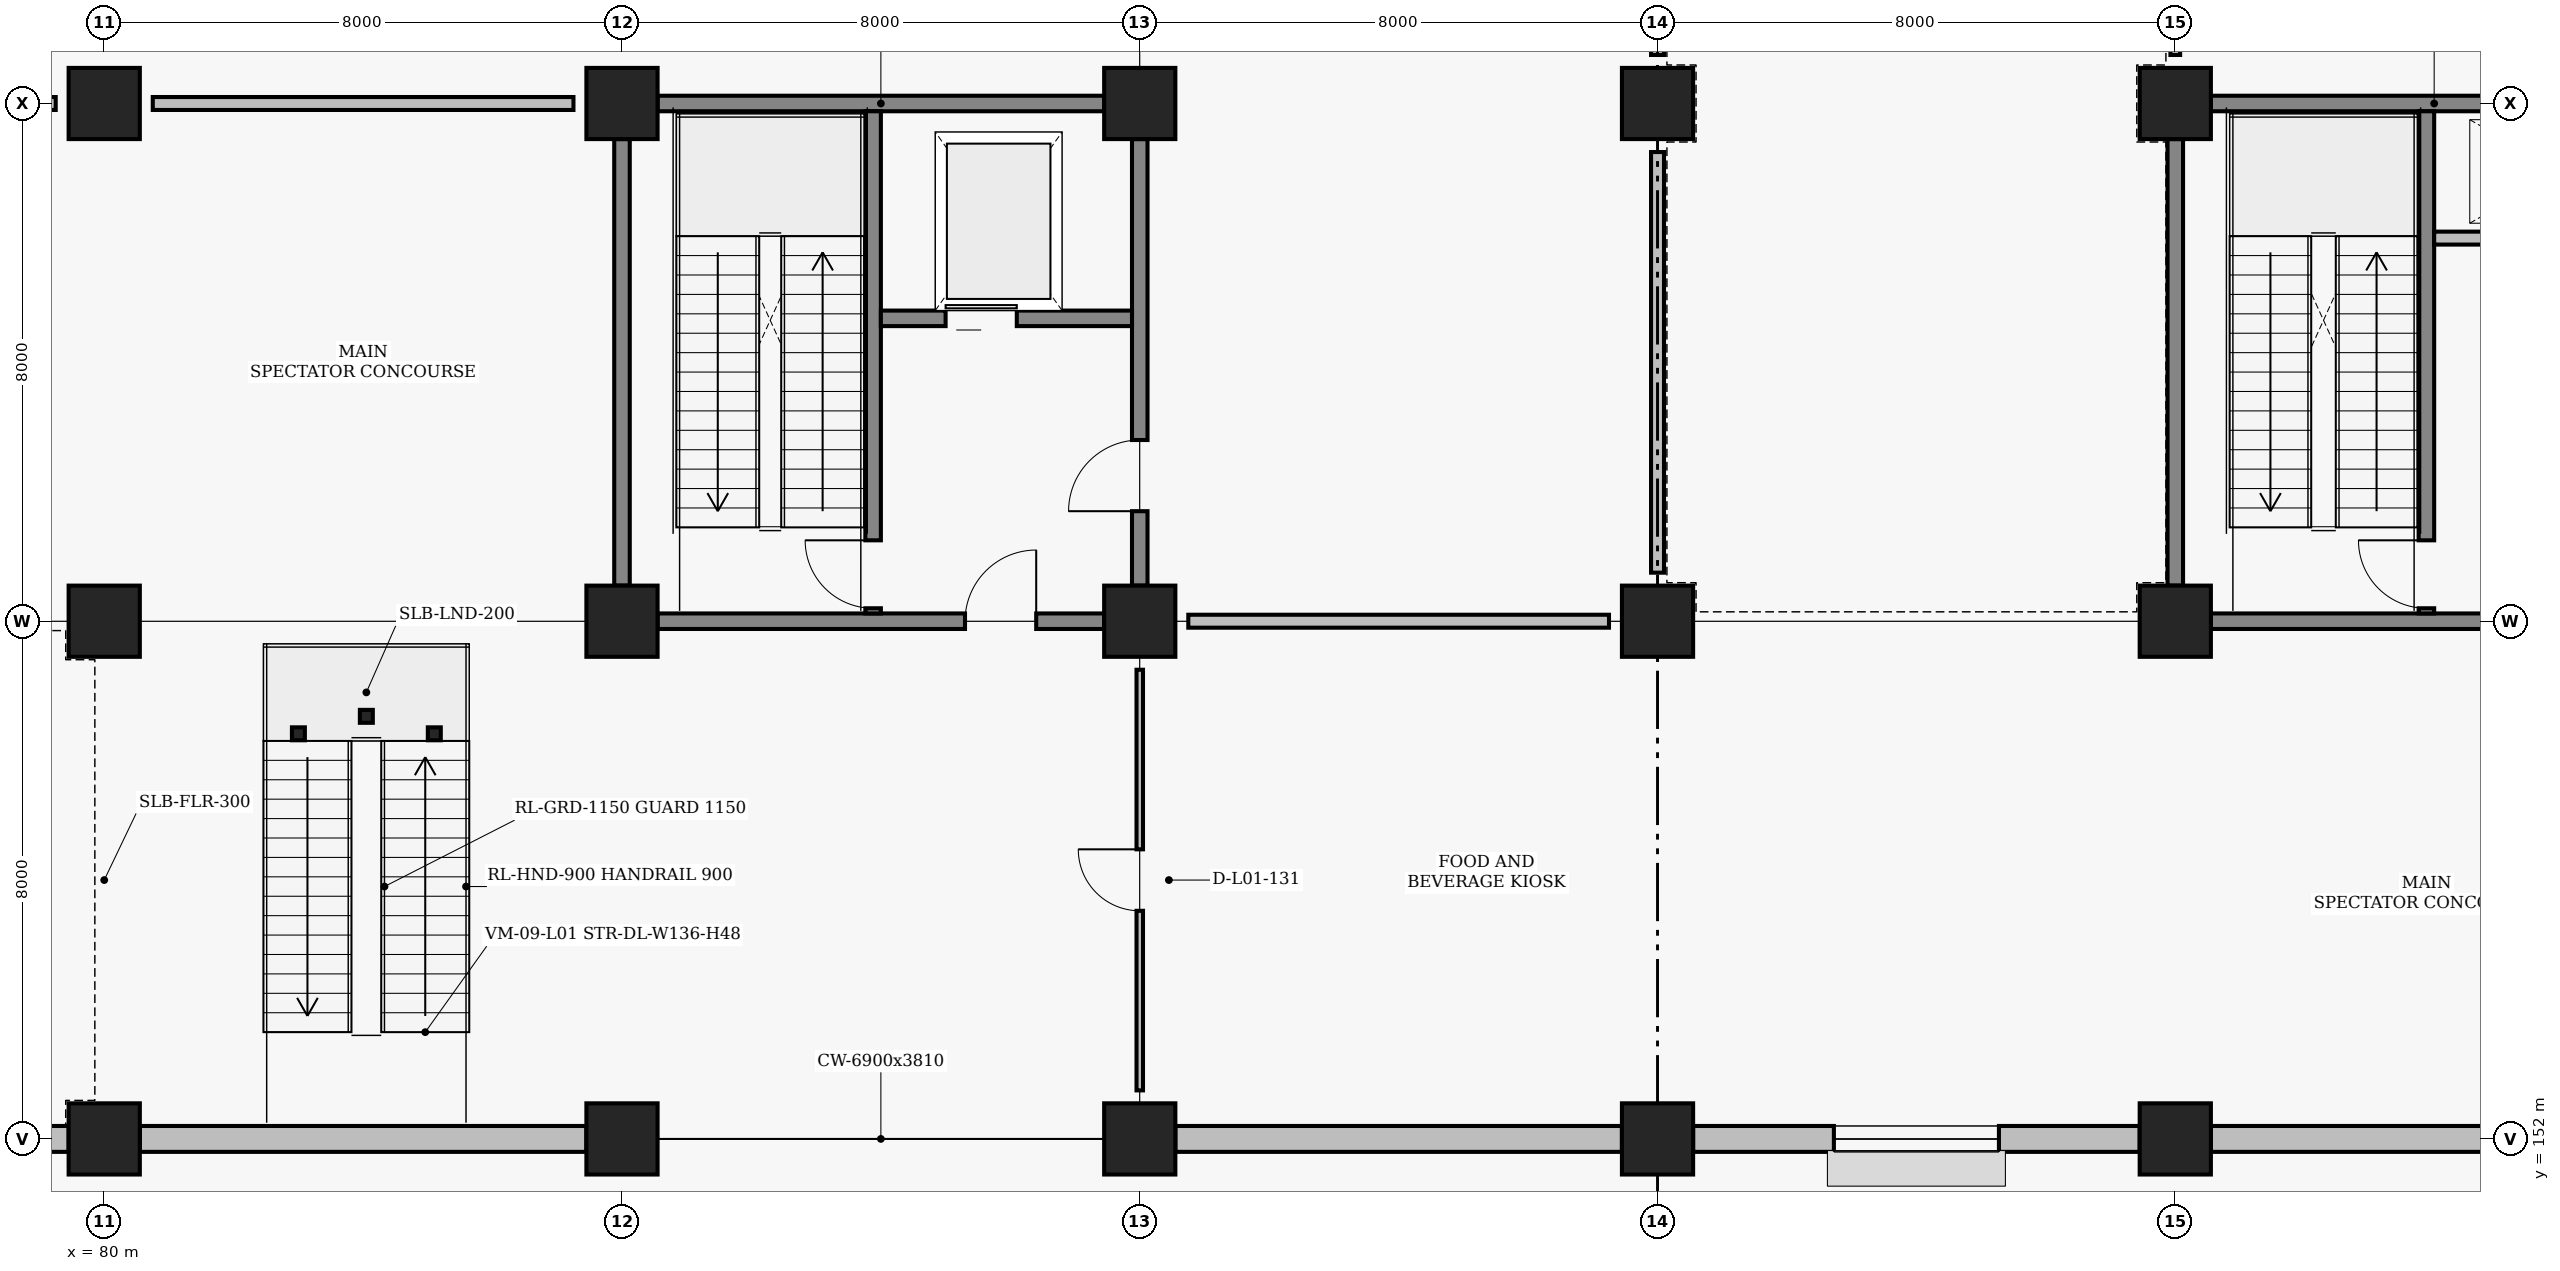
"""IFC4 building model, lengths in metres.
Left out: names, types, materials, properties, quantities, classifications, styles, units other than length and angle.
Written with IfcOpenShell. Run it as: python <this file> out.ifc"""

import sys

from ifc_helpers import new_model, si_unit, direction, frame, frame_2d, origin, origin_2d, place, context, subcontext, project, spatial, rectangle, hollow_rectangle, extrude, element, fill, save


model = new_model("IFC4")
c1 = context("Model", 3, precision=1e-05, world=origin(), true_north=direction((0.0, 1.0)))
c2 = subcontext(c1, "Body", "Model", "MODEL_VIEW")
j1 = project(units=[si_unit("LENGTHUNIT", "METRE"), si_unit("PLANEANGLEUNIT", "RADIAN")], contexts=[c1])
p1 = place(None, origin())
s1 = spatial("IfcSite", under=j1, at=p1, CompositionType="ELEMENT")
p2 = place(p1, origin())
s2 = spatial("IfcBuilding", under=s1, at=p2, CompositionType="ELEMENT")
p3 = place(p2, origin())
s3 = spatial("IfcBuildingStorey", under=s2, at=p3, CompositionType="ELEMENT", Elevation=0.0)
for number, where, z_axis, x_axis in (
    (1, (80.0, 152.0, 0.0), (0.0, 0.0, 1.0), (1.0, 0.0, 0.0)),
    (2, (80.0, 160.0, 0.0), (0.0, 0.0, 1.0), (1.0, 0.0, 0.0)),
    (3, (80.0, 168.0, 0.0), (0.0, 0.0, 1.0), (1.0, 0.0, 0.0)),
    (4, (88.0, 152.0, 0.0), (0.0, 0.0, 1.0), (1.0, 0.0, 0.0)),
    (5, (88.0, 160.0, 0.0), (0.0, 0.0, 1.0), (1.0, 0.0, 0.0)),
    (6, (88.0, 168.0, 0.0), (0.0, 0.0, 1.0), (1.0, 0.0, 0.0)),
    (7, (96.0, 152.0, 0.0), (0.0, 0.0, 1.0), (1.0, 0.0, 0.0)),
    (8, (96.0, 160.0, 0.0), (0.0, 0.0, 1.0), (1.0, 0.0, 0.0)),
    (9, (96.0, 168.0, 0.0), (0.0, 0.0, 1.0), (1.0, 0.0, 0.0)),
    (10, (104.0, 152.0, 0.0), (0.0, 0.0, 1.0), (1.0, 0.0, 0.0)),
    (11, (104.0, 160.0, 0.0), (0.0, 0.0, 1.0), (1.0, 0.0, 0.0)),
    (12, (104.0, 168.0, 0.0), (0.0, 0.0, 1.0), (1.0, 0.0, 0.0)),
    (13, (112.0, 152.0, 0.0), (0.0, 0.0, 1.0), (1.0, 0.0, 0.0)),
    (14, (112.0, 160.0, 0.0), (0.0, 0.0, 1.0), (1.0, 0.0, 0.0)),
    (15, (112.0, 168.0, 0.0), (0.0, 0.0, 1.0), (1.0, 0.0, 0.0)),
):
    element("IfcColumn", number, at=place(p3, frame(where, z_axis=z_axis, x_axis=x_axis)), inside=s3, PredefinedType="COLUMN", context=c2, shape_type="SweptSolid", body=[
        extrude(rectangle(XDim=1.1, YDim=1.1, at=origin_2d()), origin(), (0.0, 0.0, 1.0), 4.8),
    ])
p4 = place(p3, frame((72.55, 152.0, 0.0), z_axis=(0.0, 0.0, 1.0), x_axis=(1.0, 0.0, 0.0)))
e16 = element("IfcWall", 16, at=p4, inside=s3, PredefinedType="SOLIDWALL", context=c2, shape_type="SweptSolid", body=[
    extrude(rectangle(XDim=6.9, YDim=0.4, at=frame_2d((3.45, 0.0))), origin(), (0.0, 0.0, 1.0), 3.81),
])
p5 = place(p4, frame((2.325, 0.0, 0.95)))
e17 = element("IfcOpeningElement", 17, at=p5, cuts=e16, PredefinedType="OPENING", context=c2, shape_type="SweptSolid", body=[
    extrude(rectangle(XDim=2.25, YDim=1.9, at=frame_2d((1.125, 0.95))), frame((0.0, 0.21, 0.0), z_axis=(0.0, -1.0, 0.0), x_axis=(1.0, 0.0, 0.0)), (0.0, 0.0, 1.0), 0.42),
])
for number, where, z_axis, x_axis in (
    (18, (80.55, 152.0, 0.0), (0.0, 0.0, 1.0), (1.0, 0.0, 0.0)),
    (19, (96.55, 152.0, 0.0), (0.0, 0.0, 1.0), (1.0, 0.0, 0.0)),
):
    element("IfcWall", number, at=place(p3, frame(where, z_axis=z_axis, x_axis=x_axis)), inside=s3, PredefinedType="SOLIDWALL", context=c2, shape_type="SweptSolid", body=[
        extrude(rectangle(XDim=6.9, YDim=0.4, at=frame_2d((3.45, 0.0))), origin(), (0.0, 0.0, 1.0), 3.81),
    ])
p6 = place(p3, frame((104.55, 152.0, 0.0), z_axis=(0.0, 0.0, 1.0), x_axis=(1.0, 0.0, 0.0)))
e20 = element("IfcWall", 20, at=p6, inside=s3, PredefinedType="SOLIDWALL", context=c2, shape_type="SweptSolid", body=[
    extrude(rectangle(XDim=6.9, YDim=0.4, at=frame_2d((3.45, 0.0))), origin(), (0.0, 0.0, 1.0), 3.81),
])
p7 = place(p6, frame((2.175, 0.0, 0.95)))
e21 = element("IfcOpeningElement", 21, at=p7, cuts=e20, PredefinedType="OPENING", context=c2, shape_type="SweptSolid", body=[
    extrude(rectangle(XDim=2.55, YDim=2.0, at=frame_2d((1.275, 1.0))), frame((0.0, 0.21, 0.0), z_axis=(0.0, -1.0, 0.0), x_axis=(1.0, 0.0, 0.0)), (0.0, 0.0, 1.0), 0.42),
])
p8 = place(p3, frame((112.55, 152.0, 0.0), z_axis=(0.0, 0.0, 1.0), x_axis=(1.0, 0.0, 0.0)))
e22 = element("IfcWall", 22, at=p8, inside=s3, PredefinedType="SOLIDWALL", context=c2, shape_type="SweptSolid", body=[
    extrude(rectangle(XDim=6.9, YDim=0.4, at=frame_2d((3.45, 0.0))), origin(), (0.0, 0.0, 1.0), 3.81),
])
p9 = place(p3, frame((88.55, 160.0, 0.0), z_axis=(0.0, 0.0, 1.0), x_axis=(1.0, 0.0, 0.0)))
e23 = element("IfcWall", 23, at=p9, inside=s3, PredefinedType="SHEAR", context=c2, shape_type="SweptSolid", body=[
    extrude(rectangle(XDim=6.9, YDim=0.24, at=frame_2d((3.45, 0.0))), origin(), (0.0, 0.0, 1.0), 3.66),
])
p10 = place(p9, frame((4.75, 0.0, 0.0)))
e24 = element("IfcOpeningElement", 24, at=p10, cuts=e23, PredefinedType="OPENING", context=c2, shape_type="SweptSolid", body=[
    extrude(rectangle(XDim=1.1, YDim=2.2, at=frame_2d((0.55, 1.1))), frame((0.0, 0.13, 0.0), z_axis=(0.0, -1.0, 0.0), x_axis=(1.0, 0.0, 0.0)), (0.0, 0.0, 1.0), 0.26),
])
p11 = place(p3, frame((88.55, 168.0, 0.0), z_axis=(0.0, 0.0, 1.0), x_axis=(1.0, 0.0, 0.0)))
e25 = element("IfcWall", 25, at=p11, inside=s3, PredefinedType="SHEAR", context=c2, shape_type="SweptSolid", body=[
    extrude(rectangle(XDim=6.9, YDim=0.24, at=frame_2d((3.45, 0.0))), origin(), (0.0, 0.0, 1.0), 3.71),
])
p12 = place(p3, frame((88.0, 160.55, 0.0), z_axis=(0.0, 0.0, 1.0), x_axis=(0.0, 1.0, 0.0)))
e26 = element("IfcWall", 26, at=p12, inside=s3, PredefinedType="SHEAR", context=c2, shape_type="SweptSolid", body=[
    extrude(rectangle(XDim=6.9, YDim=0.24, at=frame_2d((3.45, 0.0))), origin(), (0.0, 0.0, 1.0), 3.66),
])
p13 = place(p3, frame((96.0, 160.55, 0.0), z_axis=(0.0, 0.0, 1.0), x_axis=(0.0, 1.0, 0.0)))
e27 = element("IfcWall", 27, at=p13, inside=s3, PredefinedType="SHEAR", context=c2, shape_type="SweptSolid", body=[
    extrude(rectangle(XDim=6.9, YDim=0.24, at=frame_2d((3.45, 0.0))), origin(), (0.0, 0.0, 1.0), 3.71),
])
p14 = place(p13, frame((1.15, 0.0, 0.0)))
e28 = element("IfcOpeningElement", 28, at=p14, cuts=e27, PredefinedType="OPENING", context=c2, shape_type="SweptSolid", body=[
    extrude(rectangle(XDim=1.1, YDim=2.2, at=frame_2d((0.55, 1.1))), frame((0.0, 0.13, 0.0), z_axis=(0.0, -1.0, 0.0), x_axis=(1.0, 0.0, 0.0)), (0.0, 0.0, 1.0), 0.26),
])
p15 = place(p3, frame((91.88, 160.12, 0.0), z_axis=(0.0, 0.0, 1.0), x_axis=(0.0, 1.0, 0.0)))
e29 = element("IfcWall", 29, at=p15, inside=s3, PredefinedType="SHEAR", context=c2, shape_type="SweptSolid", body=[
    extrude(rectangle(XDim=7.76, YDim=0.24, at=frame_2d((3.88, 0.0))), origin(), (0.0, 0.0, 1.0), 4.01),
])
p16 = place(p15, frame((0.08, 0.0, 0.0)))
e30 = element("IfcOpeningElement", 30, at=p16, cuts=e29, PredefinedType="OPENING", context=c2, shape_type="SweptSolid", body=[
    extrude(rectangle(XDim=1.05, YDim=2.15, at=frame_2d((0.525, 1.075))), frame((0.0, 0.13, 0.0), z_axis=(0.0, -1.0, 0.0), x_axis=(1.0, 0.0, 0.0)), (0.0, 0.0, 1.0), 0.26),
])
p17 = place(p3, frame((92.0, 164.68, 0.0), z_axis=(0.0, 0.0, 1.0), x_axis=(1.0, 0.0, 0.0)))
e31 = element("IfcWall", 31, at=p17, inside=s3, PredefinedType="SHEAR", context=c2, shape_type="SweptSolid", body=[
    extrude(rectangle(XDim=3.88, YDim=0.24, at=frame_2d((1.94, 0.0))), origin(), (0.0, 0.0, 1.0), 3.81),
])
p18 = place(p17, frame((1.0, 0.0, 0.0)))
e32 = element("IfcOpeningElement", 32, at=p18, cuts=e31, PredefinedType="OPENING", context=c2, shape_type="SweptSolid", body=[
    extrude(rectangle(XDim=1.1, YDim=2.15, at=frame_2d((0.55, 1.075))), frame((0.0, 0.13, 0.0), z_axis=(0.0, -1.0, 0.0), x_axis=(1.0, 0.0, 0.0)), (0.0, 0.0, 1.0), 0.26),
])
p19 = place(p3, frame((112.55, 160.0, 0.0), z_axis=(0.0, 0.0, 1.0), x_axis=(1.0, 0.0, 0.0)))
e33 = element("IfcWall", 33, at=p19, inside=s3, PredefinedType="SHEAR", context=c2, shape_type="SweptSolid", body=[
    extrude(rectangle(XDim=6.9, YDim=0.24, at=frame_2d((3.45, 0.0))), origin(), (0.0, 0.0, 1.0), 3.66),
])
p20 = place(p19, frame((4.75, 0.0, 0.0)))
e34 = element("IfcOpeningElement", 34, at=p20, cuts=e33, PredefinedType="OPENING", context=c2, shape_type="SweptSolid", body=[
    extrude(rectangle(XDim=1.1, YDim=2.2, at=frame_2d((0.55, 1.1))), frame((0.0, 0.13, 0.0), z_axis=(0.0, -1.0, 0.0), x_axis=(1.0, 0.0, 0.0)), (0.0, 0.0, 1.0), 0.26),
])
for number, where, z_axis, x_axis in (
    (35, (112.55, 168.0, 0.0), (0.0, 0.0, 1.0), (1.0, 0.0, 0.0)),
    (36, (112.0, 160.55, 0.0), (0.0, 0.0, 1.0), (0.0, 1.0, 0.0)),
):
    element("IfcWall", number, at=place(p3, frame(where, z_axis=z_axis, x_axis=x_axis)), inside=s3, PredefinedType="SHEAR", context=c2, shape_type="SweptSolid", body=[
        extrude(rectangle(XDim=6.9, YDim=0.24, at=frame_2d((3.45, 0.0))), origin(), (0.0, 0.0, 1.0), 3.71),
    ])
p21 = place(p3, frame((115.88, 160.12, 0.0), z_axis=(0.0, 0.0, 1.0), x_axis=(0.0, 1.0, 0.0)))
e37 = element("IfcWall", 37, at=p21, inside=s3, PredefinedType="SHEAR", context=c2, shape_type="SweptSolid", body=[
    extrude(rectangle(XDim=7.76, YDim=0.24, at=frame_2d((3.88, 0.0))), origin(), (0.0, 0.0, 1.0), 4.01),
])
p22 = place(p21, frame((0.08, 0.0, 0.0)))
e38 = element("IfcOpeningElement", 38, at=p22, cuts=e37, PredefinedType="OPENING", context=c2, shape_type="SweptSolid", body=[
    extrude(rectangle(XDim=1.05, YDim=2.15, at=frame_2d((0.525, 1.075))), frame((0.0, 0.13, 0.0), z_axis=(0.0, -1.0, 0.0), x_axis=(1.0, 0.0, 0.0)), (0.0, 0.0, 1.0), 0.26),
])
p23 = place(p3, frame((116.0, 165.92, 0.0), z_axis=(0.0, 0.0, 1.0), x_axis=(1.0, 0.0, 0.0)))
e39 = element("IfcWall", 39, at=p23, inside=s3, PredefinedType="PARTITIONING", context=c2, shape_type="SweptSolid", body=[
    extrude(rectangle(XDim=3.88, YDim=0.2, at=frame_2d((1.94, 0.0))), origin(), (0.0, 0.0, 1.0), 3.81),
])
p24 = place(p23, frame((1.25, 0.0, 0.0)))
e40 = element("IfcOpeningElement", 40, at=p24, cuts=e39, PredefinedType="OPENING", context=c2, shape_type="SweptSolid", body=[
    extrude(rectangle(XDim=0.85, YDim=2.05, at=frame_2d((0.425, 1.025))), frame((0.0, 0.11, 0.0), z_axis=(0.0, -1.0, 0.0), x_axis=(1.0, 0.0, 0.0)), (0.0, 0.0, 1.0), 0.22),
])
for number, where, z_axis, x_axis in (
    (41, (83.0, 158.26, 0.0), (0.0, 0.0, 1.0), (1.0, 0.0, 0.0)),
    (42, (85.1, 158.26, 0.0), (0.0, 0.0, 1.0), (1.0, 0.0, 0.0)),
    (43, (84.05, 158.53, 0.0), (0.0, 0.0, 1.0), (1.0, 0.0, 0.0)),
):
    element("IfcColumn", number, at=place(p3, frame(where, z_axis=z_axis, x_axis=x_axis)), inside=s3, PredefinedType="COLUMN", context=c2, shape_type="SweptSolid", body=[
        extrude(hollow_rectangle(XDim=0.2, YDim=0.2, WallThickness=0.009, at=origin_2d()), origin(), (0.0, 0.0, 1.0), 2.2),
    ])
p25 = place(p3, frame((72.75, 168.0, 0.0), z_axis=(0.0, 0.0, 1.0), x_axis=(1.0, 0.0, 0.0)))
e44 = element("IfcWall", 44, at=p25, inside=s3, PredefinedType="PARTITIONING", context=c2, shape_type="SweptSolid", body=[
    extrude(rectangle(XDim=6.5, YDim=0.2, at=frame_2d((3.25, 0.0))), origin(), (0.0, 0.0, 1.0), 3.66),
])
p26 = place(p3, frame((80.75, 168.0, 0.0), z_axis=(0.0, 0.0, 1.0), x_axis=(1.0, 0.0, 0.0)))
e45 = element("IfcWall", 45, at=p26, inside=s3, PredefinedType="PARTITIONING", context=c2, shape_type="SweptSolid", body=[
    extrude(rectangle(XDim=6.5, YDim=0.2, at=frame_2d((3.25, 0.0))), origin(), (0.0, 0.0, 1.0), 3.91),
])
p27 = place(p3, frame((104.0, 160.75, 0.0), z_axis=(0.0, 0.0, 1.0), x_axis=(0.0, 1.0, 0.0)))
e46 = element("IfcWall", 46, at=p27, inside=s3, PredefinedType="PARTITIONING", context=c2, shape_type="SweptSolid", body=[
    extrude(rectangle(XDim=6.5, YDim=0.2, at=frame_2d((3.25, 0.0))), origin(), (0.0, 0.0, 1.0), 3.81),
])
p28 = place(p3, frame((96.75, 160.0, 0.0), z_axis=(0.0, 0.0, 1.0), x_axis=(1.0, 0.0, 0.0)))
e47 = element("IfcWall", 47, at=p28, inside=s3, PredefinedType="PARTITIONING", context=c2, shape_type="SweptSolid", body=[
    extrude(rectangle(XDim=6.5, YDim=0.2, at=frame_2d((3.25, 0.0))), origin(), (0.0, 0.0, 1.0), 3.91),
])
p29 = place(p3, frame((104.0, 168.75, 0.0), z_axis=(0.0, 0.0, 1.0), x_axis=(0.0, 1.0, 0.0)))
e48 = element("IfcWall", 48, at=p29, inside=s3, PredefinedType="PARTITIONING", context=c2, shape_type="SweptSolid", body=[
    extrude(rectangle(XDim=8.5, YDim=0.2, at=frame_2d((4.25, 0.0))), origin(), (0.0, 0.0, 1.0), 3.71),
])
p30 = place(p3, frame((96.0, 152.75, 0.0), z_axis=(0.0, 0.0, 1.0), x_axis=(0.0, 1.0, 0.0)))
e49 = element("IfcWall", 49, at=p30, inside=s3, PredefinedType="PARTITIONING", context=c2, shape_type="SweptSolid", body=[
    extrude(rectangle(XDim=6.5, YDim=0.1, at=frame_2d((3.25, 0.0))), origin(), (0.0, 0.0, 1.0), 3.81),
])
p31 = place(p30, frame((2.775, 0.0, 0.0)))
e50 = element("IfcOpeningElement", 50, at=p31, cuts=e49, PredefinedType="OPENING", context=c2, shape_type="SweptSolid", body=[
    extrude(rectangle(XDim=0.95, YDim=2.1, at=frame_2d((0.475, 1.05))), frame((0.0, 0.06, 0.0), z_axis=(0.0, -1.0, 0.0), x_axis=(1.0, 0.0, 0.0)), (0.0, 0.0, 1.0), 0.12),
])
p32 = place(p3, frame((112.0, 168.75, 0.0), z_axis=(0.0, 0.0, 1.0), x_axis=(0.0, 1.0, 0.0)))
e51 = element("IfcWall", 51, at=p32, inside=s3, PredefinedType="PARTITIONING", context=c2, shape_type="SweptSolid", body=[
    extrude(rectangle(XDim=8.5, YDim=0.15, at=frame_2d((4.25, 0.0))), origin(), (0.0, 0.0, 1.0), 3.71),
])
p33 = place(p32, frame((3.35, 0.0, 0.0)))
e52 = element("IfcOpeningElement", 52, at=p33, cuts=e51, PredefinedType="OPENING", context=c2, shape_type="SweptSolid", body=[
    extrude(rectangle(XDim=1.8, YDim=2.3, at=frame_2d((0.9, 1.15))), frame((0.0, 0.085, 0.0), z_axis=(0.0, -1.0, 0.0), x_axis=(1.0, 0.0, 0.0)), (0.0, 0.0, 1.0), 0.17),
])
p34 = place(p7, origin())
e53 = element("IfcWindow", 53, at=p34, inside=s3, PartitioningType="SINGLE_PANEL", PredefinedType="WINDOW", context=c2, shape_type="SweptSolid", body=[
    extrude(rectangle(XDim=2.55, YDim=2.0, at=frame_2d((1.275, 1.0))), frame((0.0, 0.03, 0.0), z_axis=(0.0, -1.0, 0.0), x_axis=(1.0, 0.0, 0.0)), (0.0, 0.0, 1.0), 0.06),
])
fill(e21, e53)
p35 = place(p10, origin())
e54 = element("IfcDoor", 54, at=p35, inside=s3, OperationType="SINGLE_SWING_RIGHT", PredefinedType="DOOR", context=c2, shape_type="SweptSolid", body=[
    extrude(rectangle(XDim=1.1, YDim=2.2, at=frame_2d((0.55, 1.1))), frame((0.0, 0.025, 0.0), z_axis=(0.0, -1.0, 0.0), x_axis=(1.0, 0.0, 0.0)), (0.0, 0.0, 1.0), 0.05),
])
fill(e24, e54)
p36 = place(p14, origin())
e55 = element("IfcDoor", 55, at=p36, inside=s3, OperationType="SINGLE_SWING_LEFT", PredefinedType="DOOR", context=c2, shape_type="SweptSolid", body=[
    extrude(rectangle(XDim=1.1, YDim=2.2, at=frame_2d((0.55, 1.1))), frame((0.0, 0.025, 0.0), z_axis=(0.0, -1.0, 0.0), x_axis=(1.0, 0.0, 0.0)), (0.0, 0.0, 1.0), 0.05),
])
fill(e28, e55)
p37 = place(p16, origin())
e56 = element("IfcDoor", 56, at=p37, inside=s3, OperationType="SINGLE_SWING_RIGHT", PredefinedType="DOOR", context=c2, shape_type="SweptSolid", body=[
    extrude(rectangle(XDim=1.05, YDim=2.15, at=frame_2d((0.525, 1.075))), frame((0.0, 0.025, 0.0), z_axis=(0.0, -1.0, 0.0), x_axis=(1.0, 0.0, 0.0)), (0.0, 0.0, 1.0), 0.05),
])
fill(e30, e56)
p38 = place(p18, origin())
e57 = element("IfcDoor", 57, at=p38, inside=s3, OperationType="SLIDING_TO_LEFT", PredefinedType="DOOR", context=c2, shape_type="SweptSolid", body=[
    extrude(rectangle(XDim=1.1, YDim=2.15, at=frame_2d((0.55, 1.075))), frame((0.0, 0.025, 0.0), z_axis=(0.0, -1.0, 0.0), x_axis=(1.0, 0.0, 0.0)), (0.0, 0.0, 1.0), 0.05),
])
fill(e32, e57)
p39 = place(p22, origin())
e58 = element("IfcDoor", 58, at=p39, inside=s3, OperationType="SINGLE_SWING_RIGHT", PredefinedType="DOOR", context=c2, shape_type="SweptSolid", body=[
    extrude(rectangle(XDim=1.05, YDim=2.15, at=frame_2d((0.525, 1.075))), frame((0.0, 0.025, 0.0), z_axis=(0.0, -1.0, 0.0), x_axis=(1.0, 0.0, 0.0)), (0.0, 0.0, 1.0), 0.05),
])
fill(e38, e58)
p40 = place(p31, origin())
e59 = element("IfcDoor", 59, at=p40, inside=s3, OperationType="SINGLE_SWING_RIGHT", PredefinedType="DOOR", context=c2, shape_type="SweptSolid", body=[
    extrude(rectangle(XDim=0.95, YDim=2.1, at=frame_2d((0.475, 1.05))), frame((0.0, 0.025, 0.0), z_axis=(0.0, -1.0, 0.0), x_axis=(1.0, 0.0, 0.0)), (0.0, 0.0, 1.0), 0.05),
])
fill(e50, e59)
save(model, sys.argv[1])
